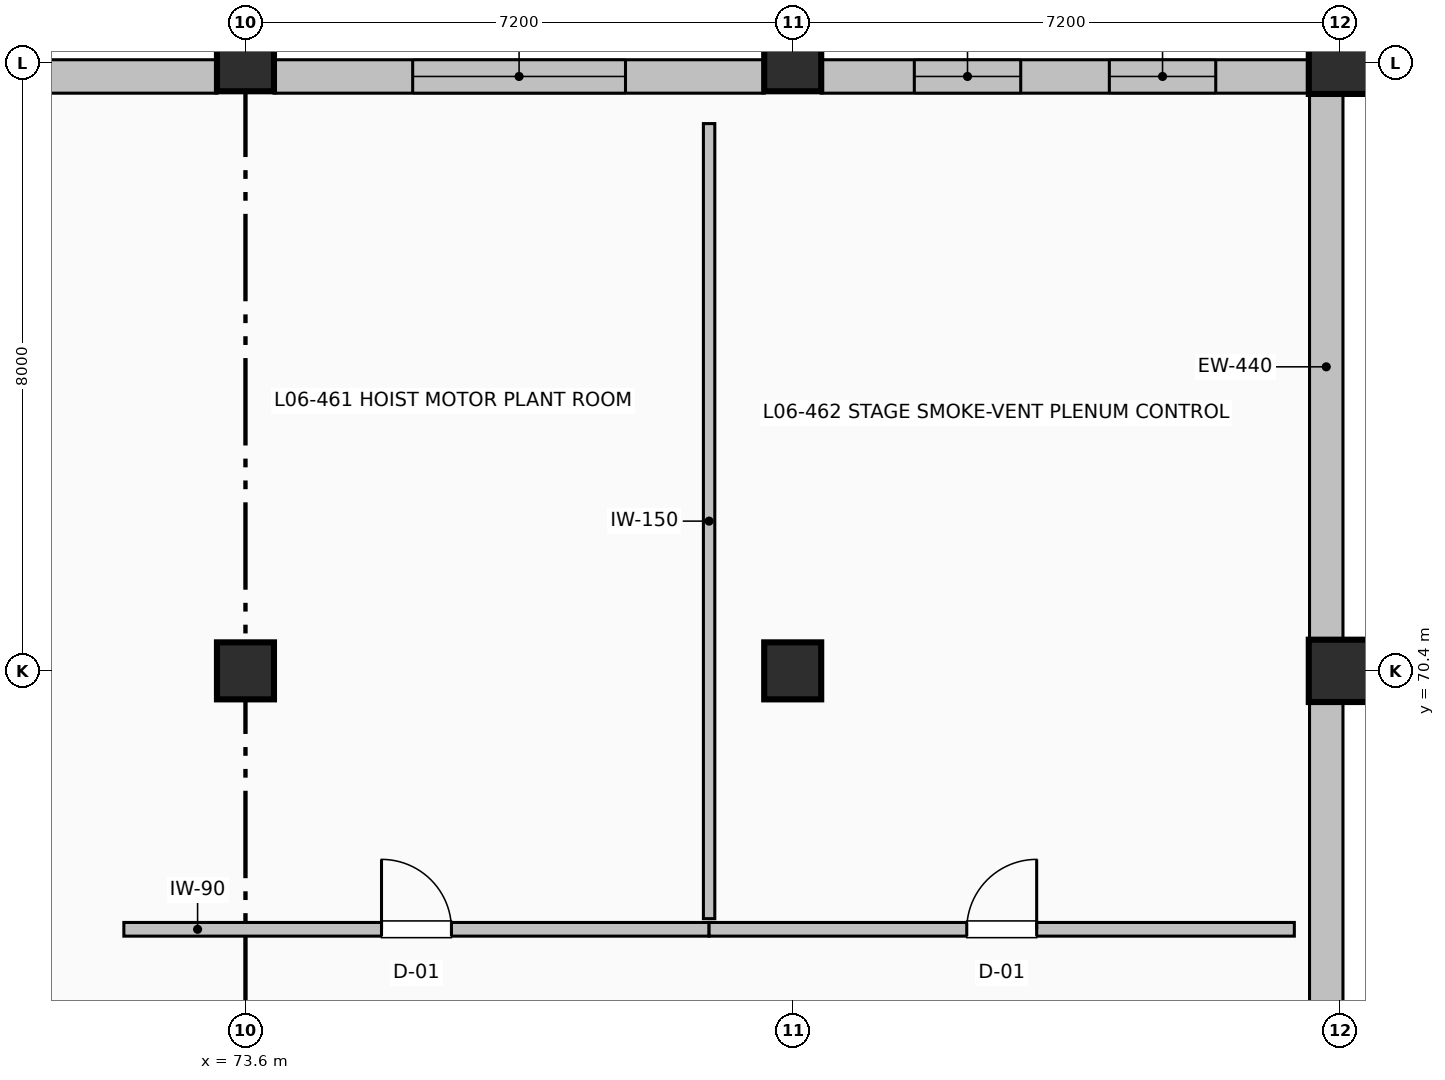
"""IFC4 building model, lengths in metres.
Left out: names, types, materials, properties, quantities, classifications, styles, units other than length and angle.
Written with IfcOpenShell. Run it as: python <this file> out.ifc"""

import sys

from ifc_helpers import new_model, si_unit, direction, frame, frame_2d, origin, origin_2d, place, context, subcontext, project, spatial, rectangle, extrude, element, fill, save


model = new_model("IFC4")
c1 = context("Model", 3, precision=1e-05, world=origin(), true_north=direction((0.0, 1.0)))
c2 = subcontext(c1, "Body", "Model", "MODEL_VIEW")
j1 = project(units=[si_unit("LENGTHUNIT", "METRE"), si_unit("PLANEANGLEUNIT", "RADIAN")], contexts=[c1])
p1 = place(None, origin())
s1 = spatial("IfcSite", under=j1, at=p1, CompositionType="ELEMENT")
p2 = place(p1, origin())
s2 = spatial("IfcBuilding", under=s1, at=p2, CompositionType="ELEMENT")
p3 = place(p2, frame((0.0, 0.0, 28.5)))
s3 = spatial("IfcBuildingStorey", under=s2, at=p3, CompositionType="ELEMENT", Elevation=28.5)
for number, where, z_axis, x_axis in (
    (1, (73.6, 70.4, 0.0), (0.0, 0.0, 1.0), (1.0, 0.0, 0.0)),
    (2, (73.6, 78.4, 0.0), (0.0, 0.0, 1.0), (1.0, 0.0, 0.0)),
    (3, (80.8, 70.4, 0.0), (0.0, 0.0, 1.0), (1.0, 0.0, 0.0)),
    (4, (80.8, 78.4, 0.0), (0.0, 0.0, 1.0), (1.0, 0.0, 0.0)),
):
    element("IfcColumn", number, at=place(p3, frame(where, z_axis=z_axis, x_axis=x_axis)), inside=s3, PredefinedType="COLUMN", context=c2, shape_type="SweptSolid", body=[
        extrude(rectangle(XDim=0.75, YDim=0.75, at=origin_2d()), origin(), (0.0, 0.0, 1.0), 5.1),
    ])
for number, where, z_axis, x_axis in (
    (5, (88.0, 70.4, 0.0), (0.0, 0.0, 1.0), (1.0, 0.0, 0.0)),
    (6, (88.0, 78.4, 0.0), (0.0, 0.0, 1.0), (1.0, 0.0, 0.0)),
):
    element("IfcColumn", number, at=place(p3, frame(where, z_axis=z_axis, x_axis=x_axis)), inside=s3, PredefinedType="COLUMN", context=c2, shape_type="SweptSolid", body=[
        extrude(rectangle(XDim=0.82, YDim=0.82, at=origin_2d()), origin(), (0.0, 0.0, 1.0), 5.1),
    ])
p4 = place(p3, frame((87.82, 77.99, 0.0), z_axis=(0.0, 0.0, 1.0), x_axis=(0.0, -1.0, 0.0)))
e7 = element("IfcWall", 7, at=p4, inside=s3, PredefinedType="SOLIDWALL", context=c2, shape_type="SweptSolid", body=[
    extrude(rectangle(XDim=7.18, YDim=0.44, at=frame_2d((3.59, 0.0))), origin(), (0.0, 0.0, 1.0), 4.192),
])
p5 = place(p3, frame((87.82, 69.99, 0.0), z_axis=(0.0, 0.0, 1.0), x_axis=(0.0, -1.0, 0.0)))
e8 = element("IfcWall", 8, at=p5, inside=s3, PredefinedType="SOLIDWALL", context=c2, shape_type="SweptSolid", body=[
    extrude(rectangle(XDim=7.08, YDim=0.44, at=frame_2d((3.54, 0.0))), origin(), (0.0, 0.0, 1.0), 4.192),
])
p6 = place(p3, frame((66.775, 78.22, 0.0), z_axis=(0.0, 0.0, 1.0), x_axis=(1.0, 0.0, 0.0)))
e9 = element("IfcWall", 9, at=p6, inside=s3, PredefinedType="SOLIDWALL", context=c2, shape_type="SweptSolid", body=[
    extrude(rectangle(XDim=6.45, YDim=0.44, at=frame_2d((3.225, 0.0))), origin(), (0.0, 0.0, 1.0), 4.8),
])
p7 = place(p3, frame((73.975, 78.22, 0.0), z_axis=(0.0, 0.0, 1.0), x_axis=(1.0, 0.0, 0.0)))
e10 = element("IfcWall", 10, at=p7, inside=s3, PredefinedType="SOLIDWALL", context=c2, shape_type="SweptSolid", body=[
    extrude(rectangle(XDim=6.45, YDim=0.44, at=frame_2d((3.225, 0.0))), origin(), (0.0, 0.0, 1.0), 4.8),
])
p8 = place(p7, frame((1.825, 0.0, 1.05)))
e11 = element("IfcOpeningElement", 11, at=p8, cuts=e10, PredefinedType="OPENING", context=c2, shape_type="SweptSolid", body=[
    extrude(rectangle(XDim=2.8, YDim=1.35, at=frame_2d((1.4, 0.675))), frame((0.0, 0.23, 0.0), z_axis=(0.0, -1.0, 0.0), x_axis=(1.0, 0.0, 0.0)), (0.0, 0.0, 1.0), 0.46),
])
p9 = place(p3, frame((81.175, 78.22, 0.0), z_axis=(0.0, 0.0, 1.0), x_axis=(1.0, 0.0, 0.0)))
e12 = element("IfcWall", 12, at=p9, inside=s3, PredefinedType="SOLIDWALL", context=c2, shape_type="SweptSolid", body=[
    extrude(rectangle(XDim=6.415, YDim=0.44, at=frame_2d((3.208, 0.0))), origin(), (0.0, 0.0, 1.0), 4.8),
])
p10 = place(p9, frame((1.225, 0.0, 1.0)))
e13 = element("IfcOpeningElement", 13, at=p10, cuts=e12, PredefinedType="OPENING", context=c2, shape_type="SweptSolid", body=[
    extrude(rectangle(XDim=1.4, YDim=1.2, at=frame_2d((0.7, 0.6))), frame((0.0, 0.23, 0.0), z_axis=(0.0, -1.0, 0.0), x_axis=(1.0, 0.0, 0.0)), (0.0, 0.0, 1.0), 0.46),
])
p11 = place(p9, frame((3.791, 0.0, 1.0)))
e14 = element("IfcOpeningElement", 14, at=p11, cuts=e12, PredefinedType="OPENING", context=c2, shape_type="SweptSolid", body=[
    extrude(rectangle(XDim=1.4, YDim=1.2, at=frame_2d((0.7, 0.6))), frame((0.0, 0.23, 0.0), z_axis=(0.0, -1.0, 0.0), x_axis=(1.0, 0.0, 0.0)), (0.0, 0.0, 1.0), 0.46),
])
p12 = place(p3, frame((72.0, 67.0, 0.0), z_axis=(0.0, 0.0, 1.0), x_axis=(1.0, 0.0, 0.0)))
e15 = element("IfcWall", 15, at=p12, inside=s3, PredefinedType="PARTITIONING", context=c2, shape_type="SweptSolid", body=[
    extrude(rectangle(XDim=7.7, YDim=0.18, at=frame_2d((3.85, 0.0))), origin(), (0.0, 0.0, 1.0), 4.185),
])
p13 = place(p12, frame((3.39, 0.0, 0.0)))
e16 = element("IfcOpeningElement", 16, at=p13, cuts=e15, PredefinedType="OPENING", context=c2, shape_type="SweptSolid", body=[
    extrude(rectangle(XDim=0.92, YDim=2.05, at=frame_2d((0.46, 1.025))), frame((0.0, 0.1, 0.0), z_axis=(0.0, -1.0, 0.0), x_axis=(1.0, 0.0, 0.0)), (0.0, 0.0, 1.0), 0.2),
])
p14 = place(p3, frame((79.7, 67.14, 0.0), z_axis=(0.0, 0.0, 1.0), x_axis=(0.0, 1.0, 0.0)))
e17 = element("IfcWall", 17, at=p14, inside=s3, PredefinedType="PARTITIONING", context=c2, shape_type="SweptSolid", body=[
    extrude(rectangle(XDim=10.46, YDim=0.15, at=frame_2d((5.23, 0.0))), origin(), (0.0, 0.0, 1.0), 4.792),
])
p15 = place(p3, frame((79.7, 67.0, 0.0), z_axis=(0.0, 0.0, 1.0), x_axis=(1.0, 0.0, 0.0)))
e18 = element("IfcWall", 18, at=p15, inside=s3, PredefinedType="PARTITIONING", context=c2, shape_type="SweptSolid", body=[
    extrude(rectangle(XDim=7.7, YDim=0.18, at=frame_2d((3.85, 0.0))), origin(), (0.0, 0.0, 1.0), 4.185),
])
p16 = place(p15, frame((3.39, 0.0, 0.0)))
e19 = element("IfcOpeningElement", 19, at=p16, cuts=e18, PredefinedType="OPENING", context=c2, shape_type="SweptSolid", body=[
    extrude(rectangle(XDim=0.92, YDim=2.05, at=frame_2d((0.46, 1.025))), frame((0.0, 0.1, 0.0), z_axis=(0.0, -1.0, 0.0), x_axis=(1.0, 0.0, 0.0)), (0.0, 0.0, 1.0), 0.2),
])
p17 = place(p8, origin())
e20 = element("IfcWindow", 20, at=p17, inside=s3, PartitioningType="SINGLE_PANEL", PredefinedType="WINDOW", context=c2, shape_type="SweptSolid", body=[
    extrude(rectangle(XDim=2.8, YDim=1.35, at=frame_2d((1.4, 0.675))), frame((0.0, 0.03, 0.0), z_axis=(0.0, -1.0, 0.0), x_axis=(1.0, 0.0, 0.0)), (0.0, 0.0, 1.0), 0.06),
])
fill(e11, e20)
p18 = place(p10, origin())
e21 = element("IfcWindow", 21, at=p18, inside=s3, PartitioningType="SINGLE_PANEL", PredefinedType="WINDOW", context=c2, shape_type="SweptSolid", body=[
    extrude(rectangle(XDim=1.4, YDim=1.2, at=frame_2d((0.7, 0.6))), frame((0.0, 0.03, 0.0), z_axis=(0.0, -1.0, 0.0), x_axis=(1.0, 0.0, 0.0)), (0.0, 0.0, 1.0), 0.06),
])
fill(e13, e21)
p19 = place(p11, origin())
e22 = element("IfcWindow", 22, at=p19, inside=s3, PartitioningType="SINGLE_PANEL", PredefinedType="WINDOW", context=c2, shape_type="SweptSolid", body=[
    extrude(rectangle(XDim=1.4, YDim=1.2, at=frame_2d((0.7, 0.6))), frame((0.0, 0.03, 0.0), z_axis=(0.0, -1.0, 0.0), x_axis=(1.0, 0.0, 0.0)), (0.0, 0.0, 1.0), 0.06),
])
fill(e14, e22)
p20 = place(p13, origin())
e23 = element("IfcDoor", 23, at=p20, inside=s3, OperationType="SINGLE_SWING_LEFT", PredefinedType="DOOR", context=c2, shape_type="SweptSolid", body=[
    extrude(rectangle(XDim=0.92, YDim=2.05, at=frame_2d((0.46, 1.025))), frame((0.0, 0.025, 0.0), z_axis=(0.0, -1.0, 0.0), x_axis=(1.0, 0.0, 0.0)), (0.0, 0.0, 1.0), 0.05),
])
fill(e16, e23)
p21 = place(p16, origin())
e24 = element("IfcDoor", 24, at=p21, inside=s3, OperationType="SINGLE_SWING_RIGHT", PredefinedType="DOOR", context=c2, shape_type="SweptSolid", body=[
    extrude(rectangle(XDim=0.92, YDim=2.05, at=frame_2d((0.46, 1.025))), frame((0.0, 0.025, 0.0), z_axis=(0.0, -1.0, 0.0), x_axis=(1.0, 0.0, 0.0)), (0.0, 0.0, 1.0), 0.05),
])
fill(e19, e24)
save(model, sys.argv[1])
